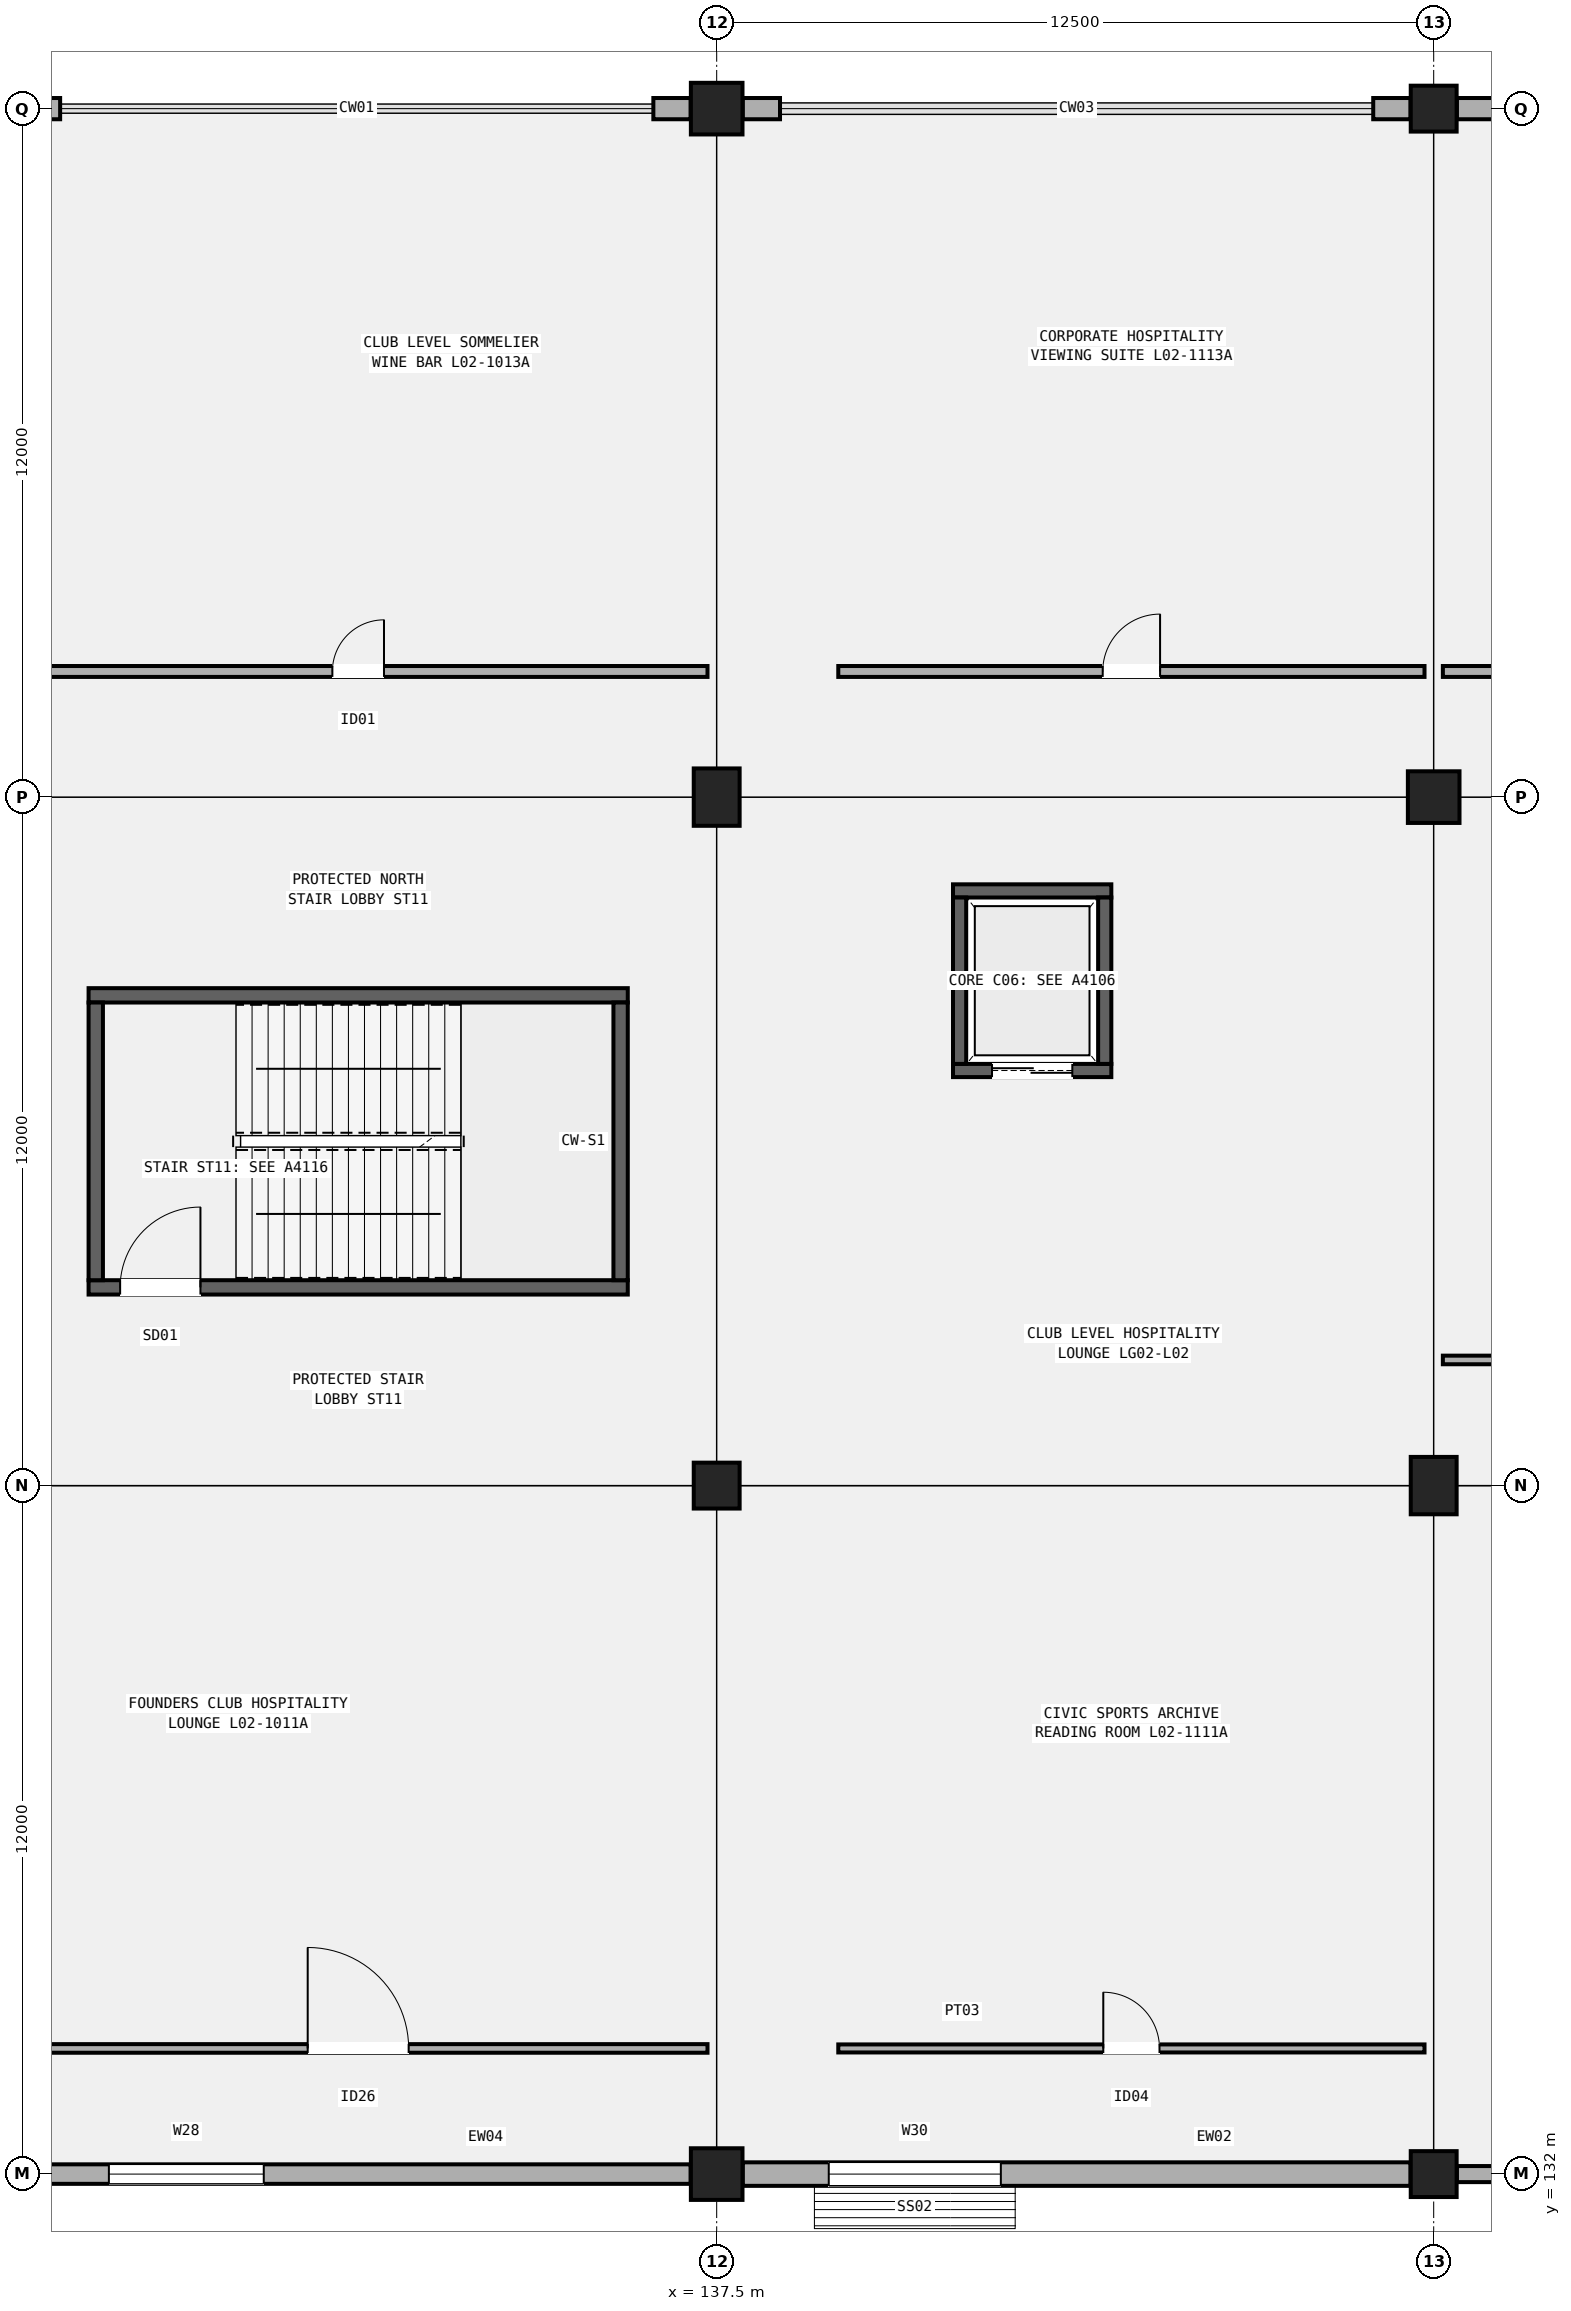
"""IFC4 building model, lengths in metres.
Left out: names, types, materials, properties, quantities, classifications, styles, units other than length and angle.
Written with IfcOpenShell. Run it as: python <this file> out.ifc"""

import sys

from ifc_helpers import new_model, si_unit, direction, frame, frame_2d, origin, origin_2d, place, context, subcontext, project, spatial, rectangle, extrude, element, fill, save


model = new_model("IFC4")
c1 = context("Model", 3, precision=1e-05, world=origin(), true_north=direction((0.0, 1.0)))
c2 = subcontext(c1, "Body", "Model", "MODEL_VIEW")
j1 = project(units=[si_unit("LENGTHUNIT", "METRE"), si_unit("PLANEANGLEUNIT", "RADIAN")], contexts=[c1])
p1 = place(None, origin())
s1 = spatial("IfcSite", under=j1, at=p1, CompositionType="ELEMENT")
p2 = place(p1, origin())
s2 = spatial("IfcBuilding", under=s1, at=p2, CompositionType="ELEMENT")
p3 = place(p2, frame((0.0, 0.0, 10.2)))
s3 = spatial("IfcBuildingStorey", under=s2, at=p3, CompositionType="ELEMENT", Elevation=10.2)
p4 = place(p3, frame((137.5, 132.0, 0.0), z_axis=(0.0, 0.0, 1.0), x_axis=(1.0, 0.0, 0.0)))
e1 = element("IfcColumn", 1, at=p4, inside=s3, PredefinedType="COLUMN", context=c2, shape_type="SweptSolid", body=[
    extrude(rectangle(XDim=0.9, YDim=0.9, at=origin_2d()), origin(), (0.0, 0.0, 1.0), 5.1),
])
p5 = place(p3, frame((137.5, 144.0, 0.0), z_axis=(0.0, 0.0, 1.0), x_axis=(1.0, 0.0, 0.0)))
e2 = element("IfcColumn", 2, at=p5, inside=s3, PredefinedType="COLUMN", context=c2, shape_type="SweptSolid", body=[
    extrude(rectangle(XDim=0.8, YDim=0.8, at=origin_2d()), origin(), (0.0, 0.0, 1.0), 5.1),
])
p6 = place(p3, frame((137.5, 156.0, 0.0), z_axis=(0.0, 0.0, 1.0), x_axis=(1.0, 0.0, 0.0)))
e3 = element("IfcColumn", 3, at=p6, inside=s3, PredefinedType="COLUMN", context=c2, shape_type="SweptSolid", body=[
    extrude(rectangle(XDim=0.8, YDim=1.0, at=origin_2d()), origin(), (0.0, 0.0, 1.0), 5.1),
])
p7 = place(p3, frame((137.5, 168.0, 0.0), z_axis=(0.0, 0.0, 1.0), x_axis=(1.0, 0.0, 0.0)))
e4 = element("IfcColumn", 4, at=p7, inside=s3, PredefinedType="COLUMN", context=c2, shape_type="SweptSolid", body=[
    extrude(rectangle(XDim=0.9, YDim=0.9, at=origin_2d()), origin(), (0.0, 0.0, 1.0), 5.1),
])
p8 = place(p3, frame((150.0, 132.0, 0.0), z_axis=(0.0, 0.0, 1.0), x_axis=(1.0, 0.0, 0.0)))
e5 = element("IfcColumn", 5, at=p8, inside=s3, PredefinedType="COLUMN", context=c2, shape_type="SweptSolid", body=[
    extrude(rectangle(XDim=0.8, YDim=0.8, at=origin_2d()), origin(), (0.0, 0.0, 1.0), 5.1),
])
p9 = place(p3, frame((150.0, 144.0, 0.0), z_axis=(0.0, 0.0, 1.0), x_axis=(1.0, 0.0, 0.0)))
e6 = element("IfcColumn", 6, at=p9, inside=s3, PredefinedType="COLUMN", context=c2, shape_type="SweptSolid", body=[
    extrude(rectangle(XDim=0.8, YDim=1.0, at=origin_2d()), origin(), (0.0, 0.0, 1.0), 5.1),
])
p10 = place(p3, frame((150.0, 156.0, 0.0), z_axis=(0.0, 0.0, 1.0), x_axis=(1.0, 0.0, 0.0)))
e7 = element("IfcColumn", 7, at=p10, inside=s3, PredefinedType="COLUMN", context=c2, shape_type="SweptSolid", body=[
    extrude(rectangle(XDim=0.9, YDim=0.9, at=origin_2d()), origin(), (0.0, 0.0, 1.0), 5.1),
])
p11 = place(p3, frame((150.0, 168.0, 0.0), z_axis=(0.0, 0.0, 1.0), x_axis=(1.0, 0.0, 0.0)))
e8 = element("IfcColumn", 8, at=p11, inside=s3, PredefinedType="COLUMN", context=c2, shape_type="SweptSolid", body=[
    extrude(rectangle(XDim=0.8, YDim=0.8, at=origin_2d()), origin(), (0.0, 0.0, 1.0), 5.1),
])
p12 = place(p3, frame((125.404, 132.0, 0.0), z_axis=(0.0, 0.0, 1.0), x_axis=(1.0, 0.0, 0.0)))
e9 = element("IfcWall", 9, at=p12, inside=s3, PredefinedType="SOLIDWALL", context=c2, shape_type="SweptSolid", body=[
    extrude(rectangle(XDim=11.642, YDim=0.34, at=frame_2d((5.821, 0.0))), origin(), (0.0, 0.0, 1.0), 4.02),
])
p13 = place(p12, frame((1.5, 0.0, 0.95)))
e10 = element("IfcOpeningElement", 10, at=p13, cuts=e9, PredefinedType="OPENING", context=c2, shape_type="SweptSolid", body=[
    extrude(rectangle(XDim=2.7, YDim=2.2, at=frame_2d((1.35, 1.1))), frame((0.0, 0.18, 0.0), z_axis=(0.0, -1.0, 0.0), x_axis=(1.0, 0.0, 0.0)), (0.0, 0.0, 1.0), 0.36),
])
for number, where, z_axis, x_axis in (
    (11, (125.404, 168.0, 0.0), (0.0, 0.0, 1.0), (1.0, 0.0, 0.0)),
    (12, (136.396, 168.0, 0.0), (0.0, 0.0, 1.0), (1.0, 0.0, 0.0)),
):
    element("IfcWall", number, at=place(p3, frame(where, z_axis=z_axis, x_axis=x_axis)), inside=s3, PredefinedType="SOLIDWALL", context=c2, shape_type="SweptSolid", body=[
        extrude(rectangle(XDim=0.65, YDim=0.37, at=frame_2d((0.325, 0.0))), origin(), (0.0, 0.0, 1.0), 4.02),
    ])
p14 = place(p3, frame((137.954, 132.0, 0.0), z_axis=(0.0, 0.0, 1.0), x_axis=(1.0, 0.0, 0.0)))
e13 = element("IfcWall", 13, at=p14, inside=s3, PredefinedType="SOLIDWALL", context=c2, shape_type="SweptSolid", body=[
    extrude(rectangle(XDim=11.642, YDim=0.41, at=frame_2d((5.821, 0.0))), origin(), (0.0, 0.0, 1.0), 4.12),
])
p15 = place(p14, frame((1.5, 0.0, 0.95)))
e14 = element("IfcOpeningElement", 14, at=p15, cuts=e13, PredefinedType="OPENING", context=c2, shape_type="SweptSolid", body=[
    extrude(rectangle(XDim=3.0, YDim=1.7, at=frame_2d((1.5, 0.85))), frame((0.0, 0.215, 0.0), z_axis=(0.0, -1.0, 0.0), x_axis=(1.0, 0.0, 0.0)), (0.0, 0.0, 1.0), 0.43),
])
for number, where, z_axis, x_axis in (
    (15, (137.954, 168.0, 0.0), (0.0, 0.0, 1.0), (1.0, 0.0, 0.0)),
    (16, (148.946, 168.0, 0.0), (0.0, 0.0, 1.0), (1.0, 0.0, 0.0)),
):
    element("IfcWall", number, at=place(p3, frame(where, z_axis=z_axis, x_axis=x_axis)), inside=s3, PredefinedType="SOLIDWALL", context=c2, shape_type="SweptSolid", body=[
        extrude(rectangle(XDim=0.65, YDim=0.37, at=frame_2d((0.325, 0.0))), origin(), (0.0, 0.0, 1.0), 4.12),
    ])
p16 = place(p3, frame((150.404, 132.0, 0.0), z_axis=(0.0, 0.0, 1.0), x_axis=(1.0, 0.0, 0.0)))
e17 = element("IfcWall", 17, at=p16, inside=s3, PredefinedType="SOLIDWALL", context=c2, shape_type="SweptSolid", body=[
    extrude(rectangle(XDim=11.692, YDim=0.28, at=frame_2d((5.846, 0.0))), origin(), (0.0, 0.0, 1.0), 4.22),
])
p17 = place(p16, frame((1.5, 0.0, 0.95)))
e18 = element("IfcOpeningElement", 18, at=p17, cuts=e17, PredefinedType="OPENING", context=c2, shape_type="SweptSolid", body=[
    extrude(rectangle(XDim=3.15, YDim=1.9, at=frame_2d((1.575, 0.95))), frame((0.0, 0.15, 0.0), z_axis=(0.0, -1.0, 0.0), x_axis=(1.0, 0.0, 0.0)), (0.0, 0.0, 1.0), 0.3),
])
p18 = place(p3, frame((150.404, 168.0, 0.0), z_axis=(0.0, 0.0, 1.0), x_axis=(1.0, 0.0, 0.0)))
e19 = element("IfcWall", 19, at=p18, inside=s3, PredefinedType="SOLIDWALL", context=c2, shape_type="SweptSolid", body=[
    extrude(rectangle(XDim=0.65, YDim=0.37, at=frame_2d((0.325, 0.0))), origin(), (0.0, 0.0, 1.0), 4.22),
])
p19 = place(p3, frame((126.55, 147.455, 0.0), z_axis=(0.0, 0.0, 1.0), x_axis=(1.0, 0.0, 0.0)))
e20 = element("IfcWall", 20, at=p19, inside=s3, PredefinedType="SHEAR", context=c2, shape_type="SweptSolid", body=[
    extrude(rectangle(XDim=9.4, YDim=0.25, at=frame_2d((4.7, 0.0))), origin(), (0.0, 0.0, 1.0), 4.82),
])
p20 = place(p19, frame((0.55, 0.0, 0.0)))
e21 = element("IfcOpeningElement", 21, at=p20, cuts=e20, PredefinedType="OPENING", context=c2, shape_type="SweptSolid", body=[
    extrude(rectangle(XDim=1.4, YDim=2.15, at=frame_2d((0.7, 1.075))), frame((0.0, 0.135, 0.0), z_axis=(0.0, -1.0, 0.0), x_axis=(1.0, 0.0, 0.0)), (0.0, 0.0, 1.0), 0.27),
])
p21 = place(p3, frame((126.55, 152.545, 0.0), z_axis=(0.0, 0.0, 1.0), x_axis=(1.0, 0.0, 0.0)))
e22 = element("IfcWall", 22, at=p21, inside=s3, PredefinedType="SHEAR", context=c2, shape_type="SweptSolid", body=[
    extrude(rectangle(XDim=9.4, YDim=0.25, at=frame_2d((4.7, 0.0))), origin(), (0.0, 0.0, 1.0), 4.82),
])
for number, where, z_axis, x_axis in (
    (23, (126.675, 147.58, 0.0), (0.0, 0.0, 1.0), (0.0, 1.0, 0.0)),
    (24, (135.825, 147.58, 0.0), (0.0, 0.0, 1.0), (0.0, 1.0, 0.0)),
):
    element("IfcWall", number, at=place(p3, frame(where, z_axis=z_axis, x_axis=x_axis)), inside=s3, PredefinedType="SHEAR", context=c2, shape_type="SweptSolid", body=[
        extrude(rectangle(XDim=4.84, YDim=0.25, at=frame_2d((2.42, 0.0))), origin(), (0.0, 0.0, 1.0), 4.82),
    ])
p22 = place(p3, frame((141.62, 151.235, 0.0), z_axis=(0.0, 0.0, 1.0), x_axis=(1.0, 0.0, 0.0)))
e25 = element("IfcWall", 25, at=p22, inside=s3, PredefinedType="SHEAR", context=c2, shape_type="SweptSolid", body=[
    extrude(rectangle(XDim=2.76, YDim=0.23, at=frame_2d((1.38, 0.0))), origin(), (0.0, 0.0, 1.0), 4.82),
])
p23 = place(p22, frame((0.68, 0.0, 0.0)))
e26 = element("IfcOpeningElement", 26, at=p23, cuts=e25, PredefinedType="OPENING", context=c2, shape_type="SweptSolid", body=[
    extrude(rectangle(XDim=1.4, YDim=2.25, at=frame_2d((0.7, 1.125))), frame((0.0, 0.125, 0.0), z_axis=(0.0, -1.0, 0.0), x_axis=(1.0, 0.0, 0.0)), (0.0, 0.0, 1.0), 0.25),
])
p24 = place(p3, frame((141.62, 154.365, 0.0), z_axis=(0.0, 0.0, 1.0), x_axis=(1.0, 0.0, 0.0)))
e27 = element("IfcWall", 27, at=p24, inside=s3, PredefinedType="SHEAR", context=c2, shape_type="SweptSolid", body=[
    extrude(rectangle(XDim=2.76, YDim=0.23, at=frame_2d((1.38, 0.0))), origin(), (0.0, 0.0, 1.0), 4.82),
])
for number, where, z_axis, x_axis in (
    (28, (141.735, 151.35, 0.0), (0.0, 0.0, 1.0), (0.0, 1.0, 0.0)),
    (29, (144.265, 151.35, 0.0), (0.0, 0.0, 1.0), (0.0, 1.0, 0.0)),
):
    element("IfcWall", number, at=place(p3, frame(where, z_axis=z_axis, x_axis=x_axis)), inside=s3, PredefinedType="SHEAR", context=c2, shape_type="SweptSolid", body=[
        extrude(rectangle(XDim=2.9, YDim=0.23, at=frame_2d((1.45, 0.0))), origin(), (0.0, 0.0, 1.0), 4.82),
    ])
p25 = place(p3, frame((125.16, 134.19, 0.0), z_axis=(0.0, 0.0, 1.0), x_axis=(1.0, 0.0, 0.0)))
e30 = element("IfcWall", 30, at=p25, inside=s3, PredefinedType="PARTITIONING", context=c2, shape_type="SweptSolid", body=[
    extrude(rectangle(XDim=12.18, YDim=0.15, at=frame_2d((6.09, 0.0))), origin(), (0.0, 0.0, 1.0), 4.22),
])
p26 = place(p25, frame((5.21, 0.0, 0.0)))
e31 = element("IfcOpeningElement", 31, at=p26, cuts=e30, PredefinedType="OPENING", context=c2, shape_type="SweptSolid", body=[
    extrude(rectangle(XDim=1.76, YDim=2.3, at=frame_2d((0.88, 1.15))), frame((0.0, 0.085, 0.0), z_axis=(0.0, -1.0, 0.0), x_axis=(1.0, 0.0, 0.0)), (0.0, 0.0, 1.0), 0.17),
])
p27 = place(p3, frame((125.16, 158.19, 0.0), z_axis=(0.0, 0.0, 1.0), x_axis=(1.0, 0.0, 0.0)))
e32 = element("IfcWall", 32, at=p27, inside=s3, PredefinedType="PARTITIONING", context=c2, shape_type="SweptSolid", body=[
    extrude(rectangle(XDim=12.18, YDim=0.19, at=frame_2d((6.09, 0.0))), origin(), (0.0, 0.0, 1.0), 4.22),
])
p28 = place(p27, frame((5.64, 0.0, 0.0)))
e33 = element("IfcOpeningElement", 33, at=p28, cuts=e32, PredefinedType="OPENING", context=c2, shape_type="SweptSolid", body=[
    extrude(rectangle(XDim=0.9, YDim=2.06, at=frame_2d((0.45, 1.03))), frame((0.0, 0.105, 0.0), z_axis=(0.0, -1.0, 0.0), x_axis=(1.0, 0.0, 0.0)), (0.0, 0.0, 1.0), 0.21),
])
p29 = place(p3, frame((139.62, 134.19, 0.0), z_axis=(0.0, 0.0, 1.0), x_axis=(1.0, 0.0, 0.0)))
e34 = element("IfcWall", 34, at=p29, inside=s3, PredefinedType="PARTITIONING", context=c2, shape_type="SweptSolid", body=[
    extrude(rectangle(XDim=10.22, YDim=0.14, at=frame_2d((5.11, 0.0))), origin(), (0.0, 0.0, 1.0), 4.22),
])
p30 = place(p29, frame((4.62, 0.0, 0.0)))
e35 = element("IfcOpeningElement", 35, at=p30, cuts=e34, PredefinedType="OPENING", context=c2, shape_type="SweptSolid", body=[
    extrude(rectangle(XDim=0.98, YDim=2.1, at=frame_2d((0.49, 1.05))), frame((0.0, 0.08, 0.0), z_axis=(0.0, -1.0, 0.0), x_axis=(1.0, 0.0, 0.0)), (0.0, 0.0, 1.0), 0.16),
])
p31 = place(p3, frame((139.62, 158.19, 0.0), z_axis=(0.0, 0.0, 1.0), x_axis=(1.0, 0.0, 0.0)))
e36 = element("IfcWall", 36, at=p31, inside=s3, PredefinedType="PARTITIONING", context=c2, shape_type="SweptSolid", body=[
    extrude(rectangle(XDim=10.22, YDim=0.19, at=frame_2d((5.11, 0.0))), origin(), (0.0, 0.0, 1.0), 4.22),
])
p32 = place(p31, frame((4.61, 0.0, 0.0)))
e37 = element("IfcOpeningElement", 37, at=p32, cuts=e36, PredefinedType="OPENING", context=c2, shape_type="SweptSolid", body=[
    extrude(rectangle(XDim=1.0, YDim=2.14, at=frame_2d((0.5, 1.07))), frame((0.0, 0.105, 0.0), z_axis=(0.0, -1.0, 0.0), x_axis=(1.0, 0.0, 0.0)), (0.0, 0.0, 1.0), 0.21),
])
p33 = place(p3, frame((150.16, 146.19, 0.0), z_axis=(0.0, 0.0, 1.0), x_axis=(1.0, 0.0, 0.0)))
e38 = element("IfcWall", 38, at=p33, inside=s3, PredefinedType="PARTITIONING", context=c2, shape_type="SweptSolid", body=[
    extrude(rectangle(XDim=12.18, YDim=0.15, at=frame_2d((6.09, 0.0))), origin(), (0.0, 0.0, 1.0), 4.22),
])
p34 = place(p33, frame((5.56, 0.0, 0.0)))
e39 = element("IfcOpeningElement", 39, at=p34, cuts=e38, PredefinedType="OPENING", context=c2, shape_type="SweptSolid", body=[
    extrude(rectangle(XDim=1.06, YDim=2.15, at=frame_2d((0.53, 1.075))), frame((0.0, 0.085, 0.0), z_axis=(0.0, -1.0, 0.0), x_axis=(1.0, 0.0, 0.0)), (0.0, 0.0, 1.0), 0.17),
])
p35 = place(p3, frame((150.16, 158.19, 0.0), z_axis=(0.0, 0.0, 1.0), x_axis=(1.0, 0.0, 0.0)))
e40 = element("IfcWall", 40, at=p35, inside=s3, PredefinedType="PARTITIONING", context=c2, shape_type="SweptSolid", body=[
    extrude(rectangle(XDim=12.18, YDim=0.19, at=frame_2d((6.09, 0.0))), origin(), (0.0, 0.0, 1.0), 4.22),
])
p36 = place(p35, frame((5.545, 0.0, 0.0)))
e41 = element("IfcOpeningElement", 41, at=p36, cuts=e40, PredefinedType="OPENING", context=c2, shape_type="SweptSolid", body=[
    extrude(rectangle(XDim=1.09, YDim=2.16, at=frame_2d((0.545, 1.08))), frame((0.0, 0.105, 0.0), z_axis=(0.0, -1.0, 0.0), x_axis=(1.0, 0.0, 0.0)), (0.0, 0.0, 1.0), 0.21),
])
p37 = place(p13, origin())
e42 = element("IfcWindow", 42, at=p37, inside=s3, PartitioningType="SINGLE_PANEL", PredefinedType="WINDOW", context=c2, shape_type="SweptSolid", body=[
    extrude(rectangle(XDim=2.7, YDim=2.2, at=frame_2d((1.35, 1.1))), frame((0.0, 0.03, 0.0), z_axis=(0.0, -1.0, 0.0), x_axis=(1.0, 0.0, 0.0)), (0.0, 0.0, 1.0), 0.06),
])
fill(e10, e42)
p38 = place(p15, origin())
e43 = element("IfcWindow", 43, at=p38, inside=s3, PartitioningType="SINGLE_PANEL", PredefinedType="WINDOW", context=c2, shape_type="SweptSolid", body=[
    extrude(rectangle(XDim=3.0, YDim=1.7, at=frame_2d((1.5, 0.85))), frame((0.0, 0.03, 0.0), z_axis=(0.0, -1.0, 0.0), x_axis=(1.0, 0.0, 0.0)), (0.0, 0.0, 1.0), 0.06),
])
fill(e14, e43)
p39 = place(p20, origin())
e44 = element("IfcDoor", 44, at=p39, inside=s3, OperationType="SINGLE_SWING_RIGHT", PredefinedType="DOOR", context=c2, shape_type="SweptSolid", body=[
    extrude(rectangle(XDim=1.4, YDim=2.15, at=frame_2d((0.7, 1.075))), frame((0.0, 0.025, 0.0), z_axis=(0.0, -1.0, 0.0), x_axis=(1.0, 0.0, 0.0)), (0.0, 0.0, 1.0), 0.05),
])
fill(e21, e44)
p40 = place(p23, origin())
e45 = element("IfcDoor", 45, at=p40, inside=s3, OperationType="DOUBLE_DOOR_SLIDING", PredefinedType="DOOR", context=c2, shape_type="SweptSolid", body=[
    extrude(rectangle(XDim=1.4, YDim=2.25, at=frame_2d((0.7, 1.125))), frame((0.0, 0.025, 0.0), z_axis=(0.0, -1.0, 0.0), x_axis=(1.0, 0.0, 0.0)), (0.0, 0.0, 1.0), 0.05),
])
fill(e26, e45)
p41 = place(p26, origin())
e46 = element("IfcDoor", 46, at=p41, inside=s3, OperationType="SINGLE_SWING_LEFT", PredefinedType="DOOR", context=c2, shape_type="SweptSolid", body=[
    extrude(rectangle(XDim=1.76, YDim=2.3, at=frame_2d((0.88, 1.15))), frame((0.0, 0.025, 0.0), z_axis=(0.0, -1.0, 0.0), x_axis=(1.0, 0.0, 0.0)), (0.0, 0.0, 1.0), 0.05),
])
fill(e31, e46)
p42 = place(p28, origin())
e47 = element("IfcDoor", 47, at=p42, inside=s3, OperationType="SINGLE_SWING_RIGHT", PredefinedType="DOOR", context=c2, shape_type="SweptSolid", body=[
    extrude(rectangle(XDim=0.9, YDim=2.06, at=frame_2d((0.45, 1.03))), frame((0.0, 0.025, 0.0), z_axis=(0.0, -1.0, 0.0), x_axis=(1.0, 0.0, 0.0)), (0.0, 0.0, 1.0), 0.05),
])
fill(e33, e47)
p43 = place(p30, origin())
e48 = element("IfcDoor", 48, at=p43, inside=s3, OperationType="SINGLE_SWING_LEFT", PredefinedType="DOOR", context=c2, shape_type="SweptSolid", body=[
    extrude(rectangle(XDim=0.98, YDim=2.1, at=frame_2d((0.49, 1.05))), frame((0.0, 0.025, 0.0), z_axis=(0.0, -1.0, 0.0), x_axis=(1.0, 0.0, 0.0)), (0.0, 0.0, 1.0), 0.05),
])
fill(e35, e48)
p44 = place(p32, origin())
e49 = element("IfcDoor", 49, at=p44, inside=s3, OperationType="SINGLE_SWING_RIGHT", PredefinedType="DOOR", context=c2, shape_type="SweptSolid", body=[
    extrude(rectangle(XDim=1.0, YDim=2.14, at=frame_2d((0.5, 1.07))), frame((0.0, 0.025, 0.0), z_axis=(0.0, -1.0, 0.0), x_axis=(1.0, 0.0, 0.0)), (0.0, 0.0, 1.0), 0.05),
])
fill(e37, e49)
save(model, sys.argv[1])
